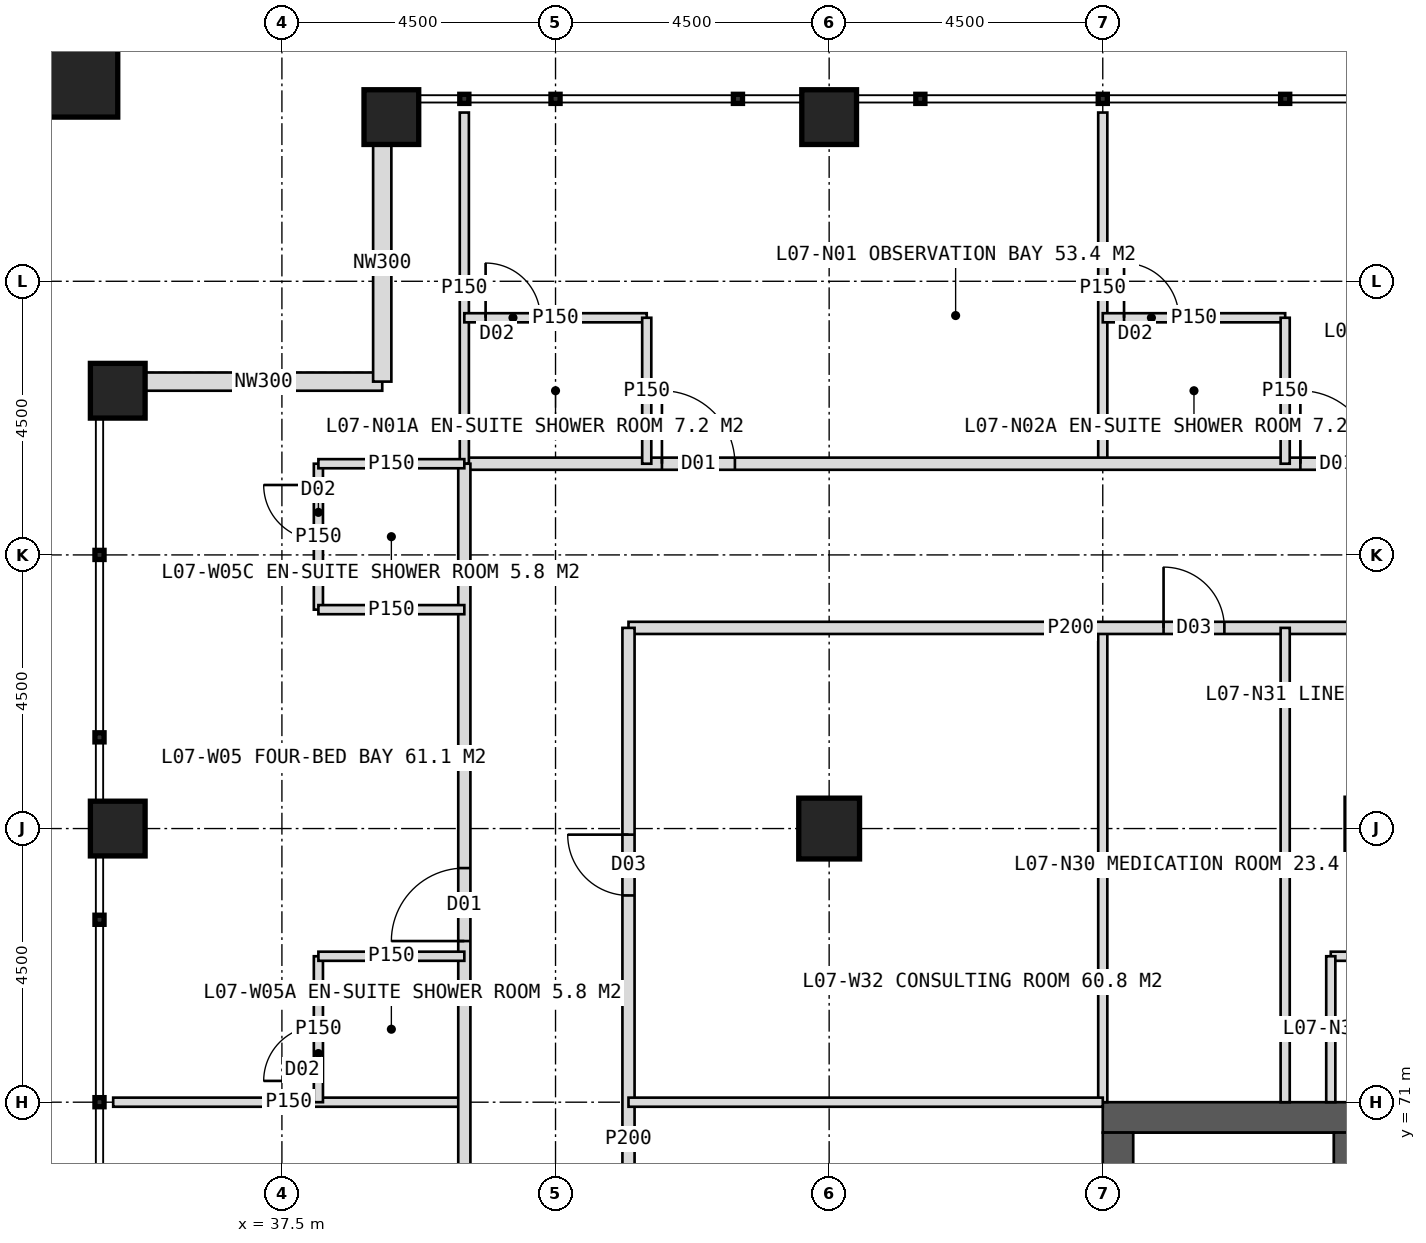
"""IFC4 building model, lengths in metres.
Left out: names, types, materials, properties, quantities, classifications, styles, units other than length and angle.
Written with IfcOpenShell. Run it as: python <this file> out.ifc"""

import sys

from ifc_helpers import new_model, si_unit, direction, frame, frame_2d, origin, origin_2d, place, context, subcontext, project, spatial, rectangle, hollow_rectangle, extrude, element, fill, save


model = new_model("IFC4")
c1 = context("Model", 3, precision=1e-05, world=origin(), true_north=direction((0.0, 1.0)))
c2 = subcontext(c1, "Body", "Model", "MODEL_VIEW")
j1 = project(units=[si_unit("LENGTHUNIT", "METRE"), si_unit("PLANEANGLEUNIT", "RADIAN")], contexts=[c1])
p1 = place(None, origin())
s1 = spatial("IfcSite", under=j1, at=p1, CompositionType="ELEMENT")
p2 = place(p1, origin())
s2 = spatial("IfcBuilding", under=s1, at=p2, CompositionType="ELEMENT")
p3 = place(p2, frame((0.0, 0.0, 35.0)))
s3 = spatial("IfcBuildingStorey", under=s2, at=p3, CompositionType="ELEMENT", Elevation=35.0)
p4 = place(p3, frame((51.0, 70.75, 0.0), z_axis=(0.0, 0.0, 1.0), x_axis=(1.0, 0.0, 0.0)))
e1 = element("IfcWall", 1, at=p4, inside=s3, PredefinedType="SHEAR", context=c2, shape_type="SweptSolid", body=[
    extrude(rectangle(XDim=18.0, YDim=0.5, at=frame_2d((9.0, 0.0))), origin(), (0.0, 0.0, 1.0), 4.0),
])
p5 = place(p4, frame((8.1, 0.0, 0.0)))
e2 = element("IfcOpeningElement", 2, at=p5, cuts=e1, PredefinedType="OPENING", context=c2, shape_type="SweptSolid", body=[
    extrude(rectangle(XDim=1.8, YDim=2.2, at=frame_2d((0.9, 1.1))), frame((0.0, 0.26, 0.0), z_axis=(0.0, -1.0, 0.0), x_axis=(1.0, 0.0, 0.0)), (0.0, 0.0, 1.0), 0.52),
])
p6 = place(p3, frame((51.25, 53.5, 0.0), z_axis=(0.0, 0.0, 1.0), x_axis=(0.0, 1.0, 0.0)))
e3 = element("IfcWall", 3, at=p6, inside=s3, PredefinedType="SHEAR", context=c2, shape_type="SweptSolid", body=[
    extrude(rectangle(XDim=17.0, YDim=0.5, at=frame_2d((8.5, 0.0))), origin(), (0.0, 0.0, 1.0), 4.0),
])
p7 = place(p6, frame((6.0, 0.0, 0.0)))
e4 = element("IfcOpeningElement", 4, at=p7, cuts=e3, PredefinedType="OPENING", context=c2, shape_type="SweptSolid", body=[
    extrude(rectangle(XDim=1.5, YDim=2.2, at=frame_2d((0.75, 1.1))), frame((0.0, 0.26, 0.0), z_axis=(0.0, -1.0, 0.0), x_axis=(1.0, 0.0, 0.0)), (0.0, 0.0, 1.0), 0.52),
])
p8 = place(p3, frame((54.95, 53.5, 0.0), z_axis=(0.0, 0.0, 1.0), x_axis=(0.0, 1.0, 0.0)))
e5 = element("IfcWall", 5, at=p8, inside=s3, PredefinedType="SHEAR", context=c2, shape_type="SweptSolid", body=[
    extrude(rectangle(XDim=17.0, YDim=0.3, at=frame_2d((8.5, 0.0))), origin(), (0.0, 0.0, 1.0), 4.0),
])
p9 = place(p3, frame((46.5, 75.5, 0.0), z_axis=(0.0, 0.0, 1.0), x_axis=(1.0, 0.0, 0.0)))
e6 = element("IfcColumn", 6, at=p9, inside=s3, PredefinedType="COLUMN", context=c2, shape_type="SweptSolid", body=[
    extrude(hollow_rectangle(XDim=1.0, YDim=1.0, WallThickness=0.1, at=origin_2d()), origin(), (0.0, 0.0, 1.0), 4.0),
])
for number, where, z_axis, x_axis in (
    (7, (39.3, 87.2, 0.0), (0.0, 0.0, 1.0), (1.0, 0.0, 0.0)),
    (8, (46.5, 87.2, 0.0), (0.0, 0.0, 1.0), (1.0, 0.0, 0.0)),
    (9, (34.8, 75.5, 0.0), (0.0, 0.0, 1.0), (1.0, 0.0, 0.0)),
    (10, (34.8, 82.7, 0.0), (0.0, 0.0, 1.0), (1.0, 0.0, 0.0)),
):
    element("IfcColumn", number, at=place(p3, frame(where, z_axis=z_axis, x_axis=x_axis)), inside=s3, PredefinedType="COLUMN", context=c2, shape_type="SweptSolid", body=[
        extrude(hollow_rectangle(XDim=0.9, YDim=0.9, WallThickness=0.08, at=origin_2d()), origin(), (0.0, 0.0, 1.0), 4.0),
    ])
p10 = place(p3, frame((33.9, 88.1, 0.0), z_axis=(0.0, 0.0, 1.0), x_axis=(1.0, 0.0, 0.0)))
e11 = element("IfcColumn", 11, at=p10, inside=s3, PredefinedType="COLUMN", context=c2, shape_type="SweptSolid", body=[
    extrude(hollow_rectangle(XDim=1.8, YDim=1.8, WallThickness=0.1, at=origin_2d()), origin(), (0.0, 0.0, 1.0), 4.0),
])
for number, where, z_axis, x_axis in (
    (12, (35.25, 82.85, 0.0), (0.0, 0.0, 1.0), (1.0, 0.0, 0.0)),
    (13, (39.15, 82.85, 0.0), (0.0, 0.0, 1.0), (0.0, 1.0, 0.0)),
):
    element("IfcWall", number, at=place(p3, frame(where, z_axis=z_axis, x_axis=x_axis)), inside=s3, PredefinedType="ELEMENTEDWALL", context=c2, shape_type="SweptSolid", body=[
        extrude(rectangle(XDim=3.9, YDim=0.3, at=frame_2d((1.95, 0.0))), origin(), (0.0, 0.0, 1.0), 2.95),
    ])
p11 = place(p3, frame((51.0, 81.5, 0.0), z_axis=(0.0, 0.0, 1.0), x_axis=(0.0, 1.0, 0.0)))
e14 = element("IfcWall", 14, at=p11, inside=s3, PredefinedType="PARTITIONING", context=c2, shape_type="SweptSolid", body=[
    extrude(rectangle(XDim=5.775, YDim=0.15, at=frame_2d((2.887, 0.0))), origin(), (0.0, 0.0, 1.0), 3.75),
])
p12 = place(p3, frame((40.5, 81.5, 0.0), z_axis=(0.0, 0.0, 1.0), x_axis=(1.0, 0.0, 0.0)))
e15 = element("IfcWall", 15, at=p12, inside=s3, PredefinedType="PARTITIONING", context=c2, shape_type="SweptSolid", body=[
    extrude(rectangle(XDim=39.0, YDim=0.2, at=frame_2d((19.5, 0.0))), origin(), (0.0, 0.0, 1.0), 3.75),
])
p13 = place(p12, frame((3.25, 0.0, 0.0)))
e16 = element("IfcOpeningElement", 16, at=p13, cuts=e15, PredefinedType="OPENING", context=c2, shape_type="SweptSolid", body=[
    extrude(rectangle(XDim=1.2, YDim=2.2, at=frame_2d((0.6, 1.1))), frame((0.0, 0.11, 0.0), z_axis=(0.0, -1.0, 0.0), x_axis=(1.0, 0.0, 0.0)), (0.0, 0.0, 1.0), 0.22),
])
p14 = place(p12, frame((13.75, 0.0, 0.0)))
e17 = element("IfcOpeningElement", 17, at=p14, cuts=e15, PredefinedType="OPENING", context=c2, shape_type="SweptSolid", body=[
    extrude(rectangle(XDim=1.2, YDim=2.2, at=frame_2d((0.6, 1.1))), frame((0.0, 0.11, 0.0), z_axis=(0.0, -1.0, 0.0), x_axis=(1.0, 0.0, 0.0)), (0.0, 0.0, 1.0), 0.22),
])
p15 = place(p12, frame((22.75, 0.0, 0.0)))
e18 = element("IfcOpeningElement", 18, at=p15, cuts=e15, PredefinedType="OPENING", context=c2, shape_type="SweptSolid", body=[
    extrude(rectangle(XDim=1.2, YDim=2.2, at=frame_2d((0.6, 1.1))), frame((0.0, 0.11, 0.0), z_axis=(0.0, -1.0, 0.0), x_axis=(1.0, 0.0, 0.0)), (0.0, 0.0, 1.0), 0.22),
])
p16 = place(p12, frame((33.25, 0.0, 0.0)))
e19 = element("IfcOpeningElement", 19, at=p16, cuts=e15, PredefinedType="OPENING", context=c2, shape_type="SweptSolid", body=[
    extrude(rectangle(XDim=1.0, YDim=2.1, at=frame_2d((0.5, 1.05))), frame((0.0, 0.11, 0.0), z_axis=(0.0, -1.0, 0.0), x_axis=(1.0, 0.0, 0.0)), (0.0, 0.0, 1.0), 0.22),
])
p17 = place(p3, frame((40.5, 81.5, 0.0), z_axis=(0.0, 0.0, 1.0), x_axis=(0.0, 1.0, 0.0)))
e20 = element("IfcWall", 20, at=p17, inside=s3, PredefinedType="PARTITIONING", context=c2, shape_type="SweptSolid", body=[
    extrude(rectangle(XDim=5.775, YDim=0.15, at=frame_2d((2.887, 0.0))), origin(), (0.0, 0.0, 1.0), 3.75),
])
p18 = place(p3, frame((40.5, 83.9, 0.0), z_axis=(0.0, 0.0, 1.0), x_axis=(1.0, 0.0, 0.0)))
e21 = element("IfcWall", 21, at=p18, inside=s3, PredefinedType="PARTITIONING", context=c2, shape_type="SweptSolid", body=[
    extrude(rectangle(XDim=3.0, YDim=0.15, at=frame_2d((1.5, 0.0))), origin(), (0.0, 0.0, 1.0), 3.75),
])
p19 = place(p18, frame((0.35, 0.0, 0.0)))
e22 = element("IfcOpeningElement", 22, at=p19, cuts=e21, PredefinedType="OPENING", context=c2, shape_type="SweptSolid", body=[
    extrude(rectangle(XDim=0.9, YDim=2.1, at=frame_2d((0.45, 1.05))), frame((0.0, 0.085, 0.0), z_axis=(0.0, -1.0, 0.0), x_axis=(1.0, 0.0, 0.0)), (0.0, 0.0, 1.0), 0.17),
])
p20 = place(p3, frame((43.5, 81.5, 0.0), z_axis=(0.0, 0.0, 1.0), x_axis=(0.0, 1.0, 0.0)))
e23 = element("IfcWall", 23, at=p20, inside=s3, PredefinedType="PARTITIONING", context=c2, shape_type="SweptSolid", body=[
    extrude(rectangle(XDim=2.4, YDim=0.15, at=frame_2d((1.2, 0.0))), origin(), (0.0, 0.0, 1.0), 3.75),
])
p21 = place(p3, frame((51.0, 83.9, 0.0), z_axis=(0.0, 0.0, 1.0), x_axis=(1.0, 0.0, 0.0)))
e24 = element("IfcWall", 24, at=p21, inside=s3, PredefinedType="PARTITIONING", context=c2, shape_type="SweptSolid", body=[
    extrude(rectangle(XDim=3.0, YDim=0.15, at=frame_2d((1.5, 0.0))), origin(), (0.0, 0.0, 1.0), 3.75),
])
p22 = place(p21, frame((0.35, 0.0, 0.0)))
e25 = element("IfcOpeningElement", 25, at=p22, cuts=e24, PredefinedType="OPENING", context=c2, shape_type="SweptSolid", body=[
    extrude(rectangle(XDim=0.9, YDim=2.1, at=frame_2d((0.45, 1.05))), frame((0.0, 0.085, 0.0), z_axis=(0.0, -1.0, 0.0), x_axis=(1.0, 0.0, 0.0)), (0.0, 0.0, 1.0), 0.17),
])
p23 = place(p3, frame((54.0, 81.5, 0.0), z_axis=(0.0, 0.0, 1.0), x_axis=(0.0, 1.0, 0.0)))
e26 = element("IfcWall", 26, at=p23, inside=s3, PredefinedType="PARTITIONING", context=c2, shape_type="SweptSolid", body=[
    extrude(rectangle(XDim=2.4, YDim=0.15, at=frame_2d((1.2, 0.0))), origin(), (0.0, 0.0, 1.0), 3.75),
])
p24 = place(p3, frame((51.0, 71.0, 0.0), z_axis=(0.0, 0.0, 1.0), x_axis=(0.0, 1.0, 0.0)))
e27 = element("IfcWall", 27, at=p24, inside=s3, PredefinedType="PARTITIONING", context=c2, shape_type="SweptSolid", body=[
    extrude(rectangle(XDim=7.8, YDim=0.15, at=frame_2d((3.9, 0.0))), origin(), (0.0, 0.0, 1.0), 3.75),
])
p25 = place(p3, frame((43.2, 78.8, 0.0), z_axis=(0.0, 0.0, 1.0), x_axis=(1.0, 0.0, 0.0)))
e28 = element("IfcWall", 28, at=p25, inside=s3, PredefinedType="PARTITIONING", context=c2, shape_type="SweptSolid", body=[
    extrude(rectangle(XDim=14.55, YDim=0.2, at=frame_2d((7.275, 0.0))), origin(), (0.0, 0.0, 1.0), 3.75),
])
p26 = place(p25, frame((8.8, 0.0, 0.0)))
e29 = element("IfcOpeningElement", 29, at=p26, cuts=e28, PredefinedType="OPENING", context=c2, shape_type="SweptSolid", body=[
    extrude(rectangle(XDim=1.0, YDim=2.1, at=frame_2d((0.5, 1.05))), frame((0.0, 0.11, 0.0), z_axis=(0.0, -1.0, 0.0), x_axis=(1.0, 0.0, 0.0)), (0.0, 0.0, 1.0), 0.22),
])
p27 = place(p25, frame((12.175, 0.0, 0.0)))
e30 = element("IfcOpeningElement", 30, at=p27, cuts=e28, PredefinedType="OPENING", context=c2, shape_type="SweptSolid", body=[
    extrude(rectangle(XDim=1.0, YDim=2.1, at=frame_2d((0.5, 1.05))), frame((0.0, 0.11, 0.0), z_axis=(0.0, -1.0, 0.0), x_axis=(1.0, 0.0, 0.0)), (0.0, 0.0, 1.0), 0.22),
])
p28 = place(p3, frame((54.0, 71.0, 0.0), z_axis=(0.0, 0.0, 1.0), x_axis=(0.0, 1.0, 0.0)))
e31 = element("IfcWall", 31, at=p28, inside=s3, PredefinedType="PARTITIONING", context=c2, shape_type="SweptSolid", body=[
    extrude(rectangle(XDim=7.8, YDim=0.15, at=frame_2d((3.9, 0.0))), origin(), (0.0, 0.0, 1.0), 3.75),
])
p29 = place(p3, frame((54.75, 73.4, 0.0), z_axis=(0.0, 0.0, 1.0), x_axis=(1.0, 0.0, 0.0)))
e32 = element("IfcWall", 32, at=p29, inside=s3, PredefinedType="PARTITIONING", context=c2, shape_type="SweptSolid", body=[
    extrude(rectangle(XDim=3.0, YDim=0.15, at=frame_2d((1.5, 0.0))), origin(), (0.0, 0.0, 1.0), 3.75),
])
p30 = place(p3, frame((54.75, 71.0, 0.0), z_axis=(0.0, 0.0, 1.0), x_axis=(0.0, 1.0, 0.0)))
e33 = element("IfcWall", 33, at=p30, inside=s3, PredefinedType="PARTITIONING", context=c2, shape_type="SweptSolid", body=[
    extrude(rectangle(XDim=2.4, YDim=0.15, at=frame_2d((1.2, 0.0))), origin(), (0.0, 0.0, 1.0), 3.75),
])
p31 = place(p3, frame((40.5, 71.0, 0.0), z_axis=(0.0, 0.0, 1.0), x_axis=(-1.0, 0.0, 0.0)))
e34 = element("IfcWall", 34, at=p31, inside=s3, PredefinedType="PARTITIONING", context=c2, shape_type="SweptSolid", body=[
    extrude(rectangle(XDim=5.775, YDim=0.15, at=frame_2d((2.887, 0.0))), origin(), (0.0, 0.0, 1.0), 3.75),
])
p32 = place(p3, frame((40.5, 42.5, 0.0), z_axis=(0.0, 0.0, 1.0), x_axis=(0.0, 1.0, 0.0)))
e35 = element("IfcWall", 35, at=p32, inside=s3, PredefinedType="PARTITIONING", context=c2, shape_type="SweptSolid", body=[
    extrude(rectangle(XDim=39.0, YDim=0.2, at=frame_2d((19.5, 0.0))), origin(), (0.0, 0.0, 1.0), 3.75),
])
p33 = place(p32, frame((3.25, 0.0, 0.0)))
e36 = element("IfcOpeningElement", 36, at=p33, cuts=e35, PredefinedType="OPENING", context=c2, shape_type="SweptSolid", body=[
    extrude(rectangle(XDim=1.2, YDim=2.2, at=frame_2d((0.6, 1.1))), frame((0.0, 0.11, 0.0), z_axis=(0.0, -1.0, 0.0), x_axis=(1.0, 0.0, 0.0)), (0.0, 0.0, 1.0), 0.22),
])
p34 = place(p32, frame((10.15, 0.0, 0.0)))
e37 = element("IfcOpeningElement", 37, at=p34, cuts=e35, PredefinedType="OPENING", context=c2, shape_type="SweptSolid", body=[
    extrude(rectangle(XDim=1.2, YDim=2.2, at=frame_2d((0.6, 1.1))), frame((0.0, 0.11, 0.0), z_axis=(0.0, -1.0, 0.0), x_axis=(1.0, 0.0, 0.0)), (0.0, 0.0, 1.0), 0.22),
])
p35 = place(p32, frame((16.15, 0.0, 0.0)))
e38 = element("IfcOpeningElement", 38, at=p35, cuts=e35, PredefinedType="OPENING", context=c2, shape_type="SweptSolid", body=[
    extrude(rectangle(XDim=1.2, YDim=2.2, at=frame_2d((0.6, 1.1))), frame((0.0, 0.11, 0.0), z_axis=(0.0, -1.0, 0.0), x_axis=(1.0, 0.0, 0.0)), (0.0, 0.0, 1.0), 0.22),
])
p36 = place(p32, frame((22.75, 0.0, 0.0)))
e39 = element("IfcOpeningElement", 39, at=p36, cuts=e35, PredefinedType="OPENING", context=c2, shape_type="SweptSolid", body=[
    extrude(rectangle(XDim=1.2, YDim=2.2, at=frame_2d((0.6, 1.1))), frame((0.0, 0.11, 0.0), z_axis=(0.0, -1.0, 0.0), x_axis=(1.0, 0.0, 0.0)), (0.0, 0.0, 1.0), 0.22),
])
p37 = place(p32, frame((31.15, 0.0, 0.0)))
e40 = element("IfcOpeningElement", 40, at=p37, cuts=e35, PredefinedType="OPENING", context=c2, shape_type="SweptSolid", body=[
    extrude(rectangle(XDim=1.2, YDim=2.2, at=frame_2d((0.6, 1.1))), frame((0.0, 0.11, 0.0), z_axis=(0.0, -1.0, 0.0), x_axis=(1.0, 0.0, 0.0)), (0.0, 0.0, 1.0), 0.22),
])
p38 = place(p3, frame((38.1, 71.0, 0.0), z_axis=(0.0, 0.0, 1.0), x_axis=(0.0, 1.0, 0.0)))
e41 = element("IfcWall", 41, at=p38, inside=s3, PredefinedType="PARTITIONING", context=c2, shape_type="SweptSolid", body=[
    extrude(rectangle(XDim=2.4, YDim=0.15, at=frame_2d((1.2, 0.0))), origin(), (0.0, 0.0, 1.0), 3.75),
])
p39 = place(p38, frame((0.35, 0.0, 0.0)))
e42 = element("IfcOpeningElement", 42, at=p39, cuts=e41, PredefinedType="OPENING", context=c2, shape_type="SweptSolid", body=[
    extrude(rectangle(XDim=0.9, YDim=2.1, at=frame_2d((0.45, 1.05))), frame((0.0, 0.085, 0.0), z_axis=(0.0, -1.0, 0.0), x_axis=(1.0, 0.0, 0.0)), (0.0, 0.0, 1.0), 0.17),
])
p40 = place(p3, frame((40.5, 73.4, 0.0), z_axis=(0.0, 0.0, 1.0), x_axis=(-1.0, 0.0, 0.0)))
e43 = element("IfcWall", 43, at=p40, inside=s3, PredefinedType="PARTITIONING", context=c2, shape_type="SweptSolid", body=[
    extrude(rectangle(XDim=2.4, YDim=0.15, at=frame_2d((1.2, 0.0))), origin(), (0.0, 0.0, 1.0), 3.75),
])
p41 = place(p3, frame((38.1, 79.1, 0.0), z_axis=(0.0, 0.0, 1.0), x_axis=(0.0, 1.0, 0.0)))
e44 = element("IfcWall", 44, at=p41, inside=s3, PredefinedType="PARTITIONING", context=c2, shape_type="SweptSolid", body=[
    extrude(rectangle(XDim=2.4, YDim=0.15, at=frame_2d((1.2, 0.0))), origin(), (0.0, 0.0, 1.0), 3.75),
])
p42 = place(p41, frame((1.15, 0.0, 0.0)))
e45 = element("IfcOpeningElement", 45, at=p42, cuts=e44, PredefinedType="OPENING", context=c2, shape_type="SweptSolid", body=[
    extrude(rectangle(XDim=0.9, YDim=2.1, at=frame_2d((0.45, 1.05))), frame((0.0, 0.085, 0.0), z_axis=(0.0, -1.0, 0.0), x_axis=(1.0, 0.0, 0.0)), (0.0, 0.0, 1.0), 0.17),
])
for number, where, z_axis, x_axis in (
    (46, (40.5, 79.1, 0.0), (0.0, 0.0, 1.0), (-1.0, 0.0, 0.0)),
    (47, (40.5, 81.5, 0.0), (0.0, 0.0, 1.0), (-1.0, 0.0, 0.0)),
):
    element("IfcWall", number, at=place(p3, frame(where, z_axis=z_axis, x_axis=x_axis)), inside=s3, PredefinedType="PARTITIONING", context=c2, shape_type="SweptSolid", body=[
        extrude(rectangle(XDim=2.4, YDim=0.15, at=frame_2d((1.2, 0.0))), origin(), (0.0, 0.0, 1.0), 3.75),
    ])
p43 = place(p3, frame((43.2, 62.0, 0.0), z_axis=(0.0, 0.0, 1.0), x_axis=(0.0, 1.0, 0.0)))
e48 = element("IfcWall", 48, at=p43, inside=s3, PredefinedType="PARTITIONING", context=c2, shape_type="SweptSolid", body=[
    extrude(rectangle(XDim=16.8, YDim=0.2, at=frame_2d((8.4, 0.0))), origin(), (0.0, 0.0, 1.0), 3.75),
])
p44 = place(p43, frame((4.0, 0.0, 0.0)))
e49 = element("IfcOpeningElement", 49, at=p44, cuts=e48, PredefinedType="OPENING", context=c2, shape_type="SweptSolid", body=[
    extrude(rectangle(XDim=1.0, YDim=2.1, at=frame_2d((0.5, 1.05))), frame((0.0, 0.11, 0.0), z_axis=(0.0, -1.0, 0.0), x_axis=(1.0, 0.0, 0.0)), (0.0, 0.0, 1.0), 0.22),
])
p45 = place(p43, frame((12.4, 0.0, 0.0)))
e50 = element("IfcOpeningElement", 50, at=p45, cuts=e48, PredefinedType="OPENING", context=c2, shape_type="SweptSolid", body=[
    extrude(rectangle(XDim=1.0, YDim=2.1, at=frame_2d((0.5, 1.05))), frame((0.0, 0.11, 0.0), z_axis=(0.0, -1.0, 0.0), x_axis=(1.0, 0.0, 0.0)), (0.0, 0.0, 1.0), 0.22),
])
p46 = place(p3, frame((51.0, 71.0, 0.0), z_axis=(0.0, 0.0, 1.0), x_axis=(-1.0, 0.0, 0.0)))
e51 = element("IfcWall", 51, at=p46, inside=s3, PredefinedType="PARTITIONING", context=c2, shape_type="SweptSolid", body=[
    extrude(rectangle(XDim=7.8, YDim=0.15, at=frame_2d((3.9, 0.0))), origin(), (0.0, 0.0, 1.0), 3.75),
])
p47 = place(p13, origin())
e52 = element("IfcDoor", 52, at=p47, inside=s3, OperationType="SINGLE_SWING_LEFT", PredefinedType="DOOR", context=c2, shape_type="SweptSolid", body=[
    extrude(rectangle(XDim=1.2, YDim=2.2, at=frame_2d((0.6, 1.1))), frame((0.0, 0.025, 0.0), z_axis=(0.0, -1.0, 0.0), x_axis=(1.0, 0.0, 0.0)), (0.0, 0.0, 1.0), 0.05),
])
fill(e16, e52)
p48 = place(p19, origin())
e53 = element("IfcDoor", 53, at=p48, inside=s3, OperationType="SINGLE_SWING_LEFT", PredefinedType="DOOR", context=c2, shape_type="SweptSolid", body=[
    extrude(rectangle(XDim=0.9, YDim=2.1, at=frame_2d((0.45, 1.05))), frame((0.0, 0.025, 0.0), z_axis=(0.0, -1.0, 0.0), x_axis=(1.0, 0.0, 0.0)), (0.0, 0.0, 1.0), 0.05),
])
fill(e22, e53)
p49 = place(p14, origin())
e54 = element("IfcDoor", 54, at=p49, inside=s3, OperationType="SINGLE_SWING_LEFT", PredefinedType="DOOR", context=c2, shape_type="SweptSolid", body=[
    extrude(rectangle(XDim=1.2, YDim=2.2, at=frame_2d((0.6, 1.1))), frame((0.0, 0.025, 0.0), z_axis=(0.0, -1.0, 0.0), x_axis=(1.0, 0.0, 0.0)), (0.0, 0.0, 1.0), 0.05),
])
fill(e17, e54)
p50 = place(p22, origin())
e55 = element("IfcDoor", 55, at=p50, inside=s3, OperationType="SINGLE_SWING_LEFT", PredefinedType="DOOR", context=c2, shape_type="SweptSolid", body=[
    extrude(rectangle(XDim=0.9, YDim=2.1, at=frame_2d((0.45, 1.05))), frame((0.0, 0.025, 0.0), z_axis=(0.0, -1.0, 0.0), x_axis=(1.0, 0.0, 0.0)), (0.0, 0.0, 1.0), 0.05),
])
fill(e25, e55)
p51 = place(p26, origin())
e56 = element("IfcDoor", 56, at=p51, inside=s3, OperationType="SINGLE_SWING_LEFT", PredefinedType="DOOR", context=c2, shape_type="SweptSolid", body=[
    extrude(rectangle(XDim=1.0, YDim=2.1, at=frame_2d((0.5, 1.05))), frame((0.0, 0.025, 0.0), z_axis=(0.0, -1.0, 0.0), x_axis=(1.0, 0.0, 0.0)), (0.0, 0.0, 1.0), 0.05),
])
fill(e29, e56)
p52 = place(p37, origin())
e57 = element("IfcDoor", 57, at=p52, inside=s3, OperationType="SINGLE_SWING_LEFT", PredefinedType="DOOR", context=c2, shape_type="SweptSolid", body=[
    extrude(rectangle(XDim=1.2, YDim=2.2, at=frame_2d((0.6, 1.1))), frame((0.0, 0.025, 0.0), z_axis=(0.0, -1.0, 0.0), x_axis=(1.0, 0.0, 0.0)), (0.0, 0.0, 1.0), 0.05),
])
fill(e40, e57)
p53 = place(p39, origin())
e58 = element("IfcDoor", 58, at=p53, inside=s3, OperationType="SINGLE_SWING_LEFT", PredefinedType="DOOR", context=c2, shape_type="SweptSolid", body=[
    extrude(rectangle(XDim=0.9, YDim=2.1, at=frame_2d((0.45, 1.05))), frame((0.0, 0.025, 0.0), z_axis=(0.0, -1.0, 0.0), x_axis=(1.0, 0.0, 0.0)), (0.0, 0.0, 1.0), 0.05),
])
fill(e42, e58)
p54 = place(p42, origin())
e59 = element("IfcDoor", 59, at=p54, inside=s3, OperationType="SINGLE_SWING_RIGHT", PredefinedType="DOOR", context=c2, shape_type="SweptSolid", body=[
    extrude(rectangle(XDim=0.9, YDim=2.1, at=frame_2d((0.45, 1.05))), frame((0.0, 0.025, 0.0), z_axis=(0.0, -1.0, 0.0), x_axis=(1.0, 0.0, 0.0)), (0.0, 0.0, 1.0), 0.05),
])
fill(e45, e59)
p55 = place(p45, origin())
e60 = element("IfcDoor", 60, at=p55, inside=s3, OperationType="SINGLE_SWING_RIGHT", PredefinedType="DOOR", context=c2, shape_type="SweptSolid", body=[
    extrude(rectangle(XDim=1.0, YDim=2.1, at=frame_2d((0.5, 1.05))), frame((0.0, 0.025, 0.0), z_axis=(0.0, -1.0, 0.0), x_axis=(1.0, 0.0, 0.0)), (0.0, 0.0, 1.0), 0.05),
])
fill(e50, e60)
save(model, sys.argv[1])
